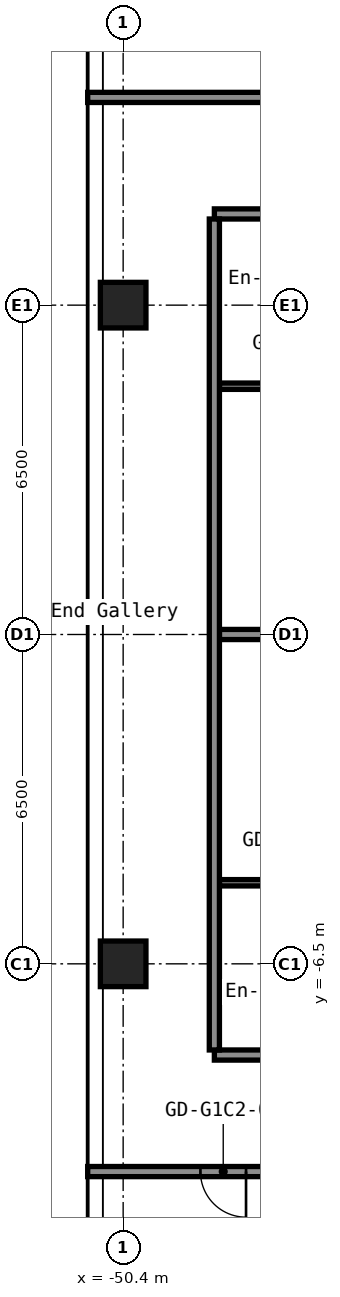
"""IFC4 building model, lengths in metres.
Left out: names, types, materials, properties, quantities, classifications, styles, units other than length and angle.
Written with IfcOpenShell. Run it as: python <this file> out.ifc"""

import sys

from ifc_helpers import new_model, si_unit, direction, frame, frame_2d, origin, origin_2d, place, context, subcontext, project, spatial, rectangle, hollow_rectangle, extrude, element, fill, save


model = new_model("IFC4")
c1 = context("Model", 3, precision=1e-05, world=origin(), true_north=direction((0.0, 1.0)))
c2 = subcontext(c1, "Body", "Model", "MODEL_VIEW")
j1 = project(units=[si_unit("LENGTHUNIT", "METRE"), si_unit("PLANEANGLEUNIT", "RADIAN")], contexts=[c1])
p1 = place(None, origin())
s1 = spatial("IfcSite", under=j1, at=p1, CompositionType="ELEMENT")
p2 = place(p1, origin())
s2 = spatial("IfcBuilding", under=s1, at=p2, CompositionType="ELEMENT")
p3 = place(p2, frame((0.0, 0.0, 58.2)))
s3 = spatial("IfcBuildingStorey", under=s2, at=p3, CompositionType="ELEMENT", Elevation=58.2)
for number, where, z_axis, x_axis in (
    (1, (-50.4, -6.5, 0.0), (0.0, 0.0, 1.0), (1.0, 0.0, 0.0)),
    (2, (-50.4, 6.5, 0.0), (0.0, 0.0, 1.0), (1.0, 0.0, 0.0)),
):
    element("IfcColumn", number, at=place(p3, frame(where, z_axis=z_axis, x_axis=x_axis)), inside=s3, PredefinedType="COLUMN", context=c2, shape_type="SweptSolid", body=[
        extrude(hollow_rectangle(XDim=0.9, YDim=0.9, WallThickness=0.036, at=origin_2d()), origin(), (0.0, 0.0, 1.0), 2.8),
    ])
p4 = place(p3, frame((-51.1, -10.6, 0.0), z_axis=(0.0, 0.0, 1.0), x_axis=(1.0, 0.0, 0.0)))
e3 = element("IfcWall", 3, at=p4, inside=s3, PredefinedType="PARTITIONING", context=c2, shape_type="SweptSolid", body=[
    extrude(rectangle(XDim=34.3, YDim=0.2, at=frame_2d((17.15, 0.0))), origin(), (0.0, 0.0, 1.0), 2.8),
])
p5 = place(p4, frame((2.225, 0.0, 0.0)))
e4 = element("IfcOpeningElement", 4, at=p5, cuts=e3, PredefinedType="OPENING", context=c2, shape_type="SweptSolid", body=[
    extrude(rectangle(XDim=0.9, YDim=2.1, at=frame_2d((0.45, 1.05))), frame((0.0, 0.11, 0.0), z_axis=(0.0, -1.0, 0.0), x_axis=(1.0, 0.0, 0.0)), (0.0, 0.0, 1.0), 0.22),
])
p6 = place(p4, frame((6.625, 0.0, 0.0)))
e5 = element("IfcOpeningElement", 5, at=p6, cuts=e3, PredefinedType="OPENING", context=c2, shape_type="SweptSolid", body=[
    extrude(rectangle(XDim=0.9, YDim=2.1, at=frame_2d((0.45, 1.05))), frame((0.0, 0.11, 0.0), z_axis=(0.0, -1.0, 0.0), x_axis=(1.0, 0.0, 0.0)), (0.0, 0.0, 1.0), 0.22),
])
p7 = place(p4, frame((12.8, 0.0, 0.0)))
e6 = element("IfcOpeningElement", 6, at=p7, cuts=e3, PredefinedType="OPENING", context=c2, shape_type="SweptSolid", body=[
    extrude(rectangle(XDim=1.0, YDim=2.1, at=frame_2d((0.5, 1.05))), frame((0.0, 0.11, 0.0), z_axis=(0.0, -1.0, 0.0), x_axis=(1.0, 0.0, 0.0)), (0.0, 0.0, 1.0), 0.22),
])
p8 = place(p4, frame((21.2, 0.0, 0.0)))
e7 = element("IfcOpeningElement", 7, at=p8, cuts=e3, PredefinedType="OPENING", context=c2, shape_type="SweptSolid", body=[
    extrude(rectangle(XDim=1.0, YDim=2.1, at=frame_2d((0.5, 1.05))), frame((0.0, 0.11, 0.0), z_axis=(0.0, -1.0, 0.0), x_axis=(1.0, 0.0, 0.0)), (0.0, 0.0, 1.0), 0.22),
])
p9 = place(p4, frame((27.885, 0.0, 0.0)))
e8 = element("IfcOpeningElement", 8, at=p9, cuts=e3, PredefinedType="OPENING", context=c2, shape_type="SweptSolid", body=[
    extrude(rectangle(XDim=0.9, YDim=2.1, at=frame_2d((0.45, 1.05))), frame((0.0, 0.11, 0.0), z_axis=(0.0, -1.0, 0.0), x_axis=(1.0, 0.0, 0.0)), (0.0, 0.0, 1.0), 0.22),
])
p10 = place(p4, frame((32.085, 0.0, 0.0)))
e9 = element("IfcOpeningElement", 9, at=p10, cuts=e3, PredefinedType="OPENING", context=c2, shape_type="SweptSolid", body=[
    extrude(rectangle(XDim=0.9, YDim=2.1, at=frame_2d((0.45, 1.05))), frame((0.0, 0.11, 0.0), z_axis=(0.0, -1.0, 0.0), x_axis=(1.0, 0.0, 0.0)), (0.0, 0.0, 1.0), 0.22),
])
p11 = place(p3, frame((-48.6, -8.3, 0.0), z_axis=(0.0, 0.0, 1.0), x_axis=(1.0, 0.0, 0.0)))
e10 = element("IfcWall", 10, at=p11, inside=s3, PredefinedType="PARTITIONING", context=c2, shape_type="SweptSolid", body=[
    extrude(rectangle(XDim=15.0, YDim=0.2, at=frame_2d((7.5, 0.0))), origin(), (0.0, 0.0, 1.0), 2.8),
])
p12 = place(p11, frame((4.5, 0.0, 0.0)))
e11 = element("IfcOpeningElement", 11, at=p12, cuts=e10, PredefinedType="OPENING", context=c2, shape_type="SweptSolid", body=[
    extrude(rectangle(XDim=1.0, YDim=2.1, at=frame_2d((0.5, 1.05))), frame((0.0, 0.11, 0.0), z_axis=(0.0, -1.0, 0.0), x_axis=(1.0, 0.0, 0.0)), (0.0, 0.0, 1.0), 0.22),
])
p13 = place(p11, frame((8.6, 0.0, 0.0)))
e12 = element("IfcOpeningElement", 12, at=p13, cuts=e10, PredefinedType="OPENING", context=c2, shape_type="SweptSolid", body=[
    extrude(rectangle(XDim=1.0, YDim=2.1, at=frame_2d((0.5, 1.05))), frame((0.0, 0.11, 0.0), z_axis=(0.0, -1.0, 0.0), x_axis=(1.0, 0.0, 0.0)), (0.0, 0.0, 1.0), 0.22),
])
p14 = place(p3, frame((-48.5, -4.9, 0.0), z_axis=(0.0, 0.0, 1.0), x_axis=(1.0, 0.0, 0.0)))
e13 = element("IfcWall", 13, at=p14, inside=s3, PredefinedType="PARTITIONING", context=c2, shape_type="SweptSolid", body=[
    extrude(rectangle(XDim=3.238, YDim=0.125, at=frame_2d((1.619, 0.0))), origin(), (0.0, 0.0, 1.0), 2.8),
])
p15 = place(p14, frame((1.2, 0.0, 0.0)))
e14 = element("IfcOpeningElement", 14, at=p15, cuts=e13, PredefinedType="OPENING", context=c2, shape_type="SweptSolid", body=[
    extrude(rectangle(XDim=0.8, YDim=2.1, at=frame_2d((0.4, 1.05))), frame((0.0, 0.073, 0.0), z_axis=(0.0, -1.0, 0.0), x_axis=(1.0, 0.0, 0.0)), (0.0, 0.0, 1.0), 0.145),
])
p16 = place(p3, frame((-48.5, 0.0, 0.0), z_axis=(0.0, 0.0, 1.0), x_axis=(1.0, 0.0, 0.0)))
e15 = element("IfcWall", 15, at=p16, inside=s3, PredefinedType="PARTITIONING", context=c2, shape_type="SweptSolid", body=[
    extrude(rectangle(XDim=14.9, YDim=0.2, at=frame_2d((7.45, 0.0))), origin(), (0.0, 0.0, 1.0), 2.8),
])
p17 = place(p3, frame((-48.5, 4.9, 0.0), z_axis=(0.0, 0.0, 1.0), x_axis=(1.0, 0.0, 0.0)))
e16 = element("IfcWall", 16, at=p17, inside=s3, PredefinedType="PARTITIONING", context=c2, shape_type="SweptSolid", body=[
    extrude(rectangle(XDim=3.637, YDim=0.125, at=frame_2d((1.819, 0.0))), origin(), (0.0, 0.0, 1.0), 2.8),
])
p18 = place(p17, frame((1.4, 0.0, 0.0)))
e17 = element("IfcOpeningElement", 17, at=p18, cuts=e16, PredefinedType="OPENING", context=c2, shape_type="SweptSolid", body=[
    extrude(rectangle(XDim=0.8, YDim=2.1, at=frame_2d((0.4, 1.05))), frame((0.0, 0.073, 0.0), z_axis=(0.0, -1.0, 0.0), x_axis=(1.0, 0.0, 0.0)), (0.0, 0.0, 1.0), 0.145),
])
p19 = place(p3, frame((-48.6, 8.3, 0.0), z_axis=(0.0, 0.0, 1.0), x_axis=(1.0, 0.0, 0.0)))
e18 = element("IfcWall", 18, at=p19, inside=s3, PredefinedType="PARTITIONING", context=c2, shape_type="SweptSolid", body=[
    extrude(rectangle(XDim=15.0, YDim=0.2, at=frame_2d((7.5, 0.0))), origin(), (0.0, 0.0, 1.0), 2.8),
])
p20 = place(p19, frame((9.55, 0.0, 0.0)))
e19 = element("IfcOpeningElement", 19, at=p20, cuts=e18, PredefinedType="OPENING", context=c2, shape_type="SweptSolid", body=[
    extrude(rectangle(XDim=1.6, YDim=2.1, at=frame_2d((0.8, 1.05))), frame((0.0, 0.11, 0.0), z_axis=(0.0, -1.0, 0.0), x_axis=(1.0, 0.0, 0.0)), (0.0, 0.0, 1.0), 0.22),
])
p21 = place(p3, frame((-51.1, 10.6, 0.0), z_axis=(0.0, 0.0, 1.0), x_axis=(1.0, 0.0, 0.0)))
e20 = element("IfcWall", 20, at=p21, inside=s3, PredefinedType="PARTITIONING", context=c2, shape_type="SweptSolid", body=[
    extrude(rectangle(XDim=34.3, YDim=0.2, at=frame_2d((17.15, 0.0))), origin(), (0.0, 0.0, 1.0), 2.8),
])
p22 = place(p21, frame((5.9, 0.0, 0.0)))
e21 = element("IfcOpeningElement", 21, at=p22, cuts=e20, PredefinedType="OPENING", context=c2, shape_type="SweptSolid", body=[
    extrude(rectangle(XDim=1.0, YDim=2.1, at=frame_2d((0.5, 1.05))), frame((0.0, 0.11, 0.0), z_axis=(0.0, -1.0, 0.0), x_axis=(1.0, 0.0, 0.0)), (0.0, 0.0, 1.0), 0.22),
])
p23 = place(p21, frame((11.0, 0.0, 0.0)))
e22 = element("IfcOpeningElement", 22, at=p23, cuts=e20, PredefinedType="OPENING", context=c2, shape_type="SweptSolid", body=[
    extrude(rectangle(XDim=1.0, YDim=2.1, at=frame_2d((0.5, 1.05))), frame((0.0, 0.11, 0.0), z_axis=(0.0, -1.0, 0.0), x_axis=(1.0, 0.0, 0.0)), (0.0, 0.0, 1.0), 0.22),
])
p24 = place(p21, frame((22.9, 0.0, 0.0)))
e23 = element("IfcOpeningElement", 23, at=p24, cuts=e20, PredefinedType="OPENING", context=c2, shape_type="SweptSolid", body=[
    extrude(rectangle(XDim=1.0, YDim=2.1, at=frame_2d((0.5, 1.05))), frame((0.0, 0.11, 0.0), z_axis=(0.0, -1.0, 0.0), x_axis=(1.0, 0.0, 0.0)), (0.0, 0.0, 1.0), 0.22),
])
p25 = place(p21, frame((28.75, 0.0, 0.0)))
e24 = element("IfcOpeningElement", 24, at=p25, cuts=e20, PredefinedType="OPENING", context=c2, shape_type="SweptSolid", body=[
    extrude(rectangle(XDim=1.0, YDim=2.1, at=frame_2d((0.5, 1.05))), frame((0.0, 0.11, 0.0), z_axis=(0.0, -1.0, 0.0), x_axis=(1.0, 0.0, 0.0)), (0.0, 0.0, 1.0), 0.22),
])
p26 = place(p21, frame((30.45, 0.0, 0.0)))
e25 = element("IfcOpeningElement", 25, at=p26, cuts=e20, PredefinedType="OPENING", context=c2, shape_type="SweptSolid", body=[
    extrude(rectangle(XDim=1.0, YDim=2.1, at=frame_2d((0.5, 1.05))), frame((0.0, 0.11, 0.0), z_axis=(0.0, -1.0, 0.0), x_axis=(1.0, 0.0, 0.0)), (0.0, 0.0, 1.0), 0.22),
])
p27 = place(p3, frame((-48.6, -8.2, 0.0), z_axis=(0.0, 0.0, 1.0), x_axis=(0.0, 1.0, 0.0)))
e26 = element("IfcWall", 26, at=p27, inside=s3, PredefinedType="PARTITIONING", context=c2, shape_type="SweptSolid", body=[
    extrude(rectangle(XDim=16.4, YDim=0.2, at=frame_2d((8.2, 0.0))), origin(), (0.0, 0.0, 1.0), 2.8),
])
p28 = place(p5, origin())
e27 = element("IfcDoor", 27, at=p28, inside=s3, OperationType="SINGLE_SWING_RIGHT", PredefinedType="DOOR", context=c2, shape_type="SweptSolid", body=[
    extrude(rectangle(XDim=0.9, YDim=2.1, at=frame_2d((0.45, 1.05))), frame((0.0, 0.025, 0.0), z_axis=(0.0, -1.0, 0.0), x_axis=(1.0, 0.0, 0.0)), (0.0, 0.0, 1.0), 0.05),
])
fill(e4, e27)
save(model, sys.argv[1])
